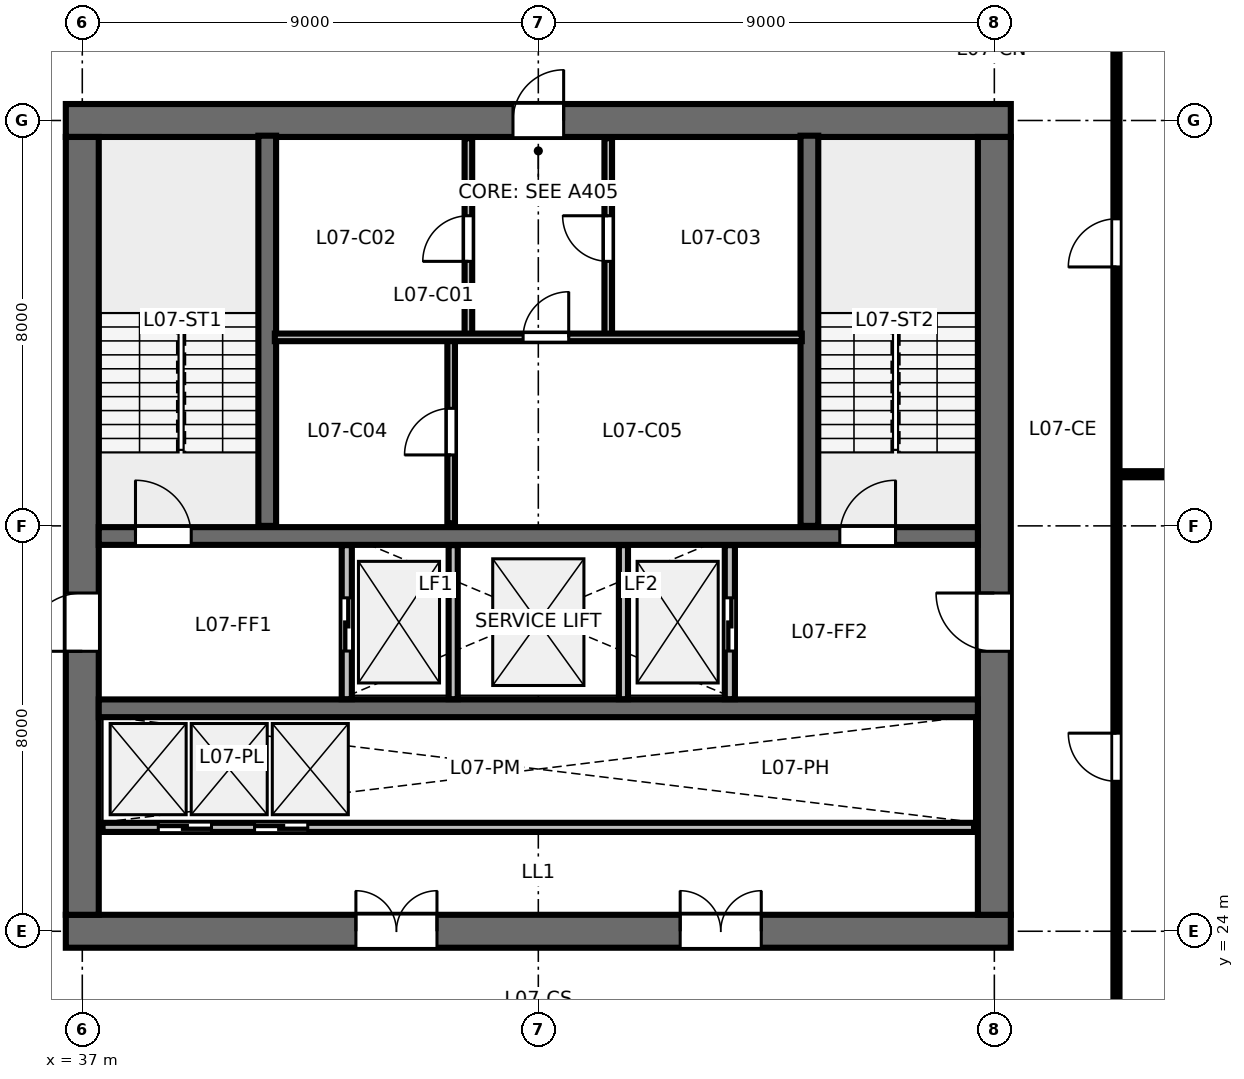
"""IFC4 building model, lengths in metres.
Left out: names, types, materials, properties, quantities, classifications, styles, units other than length and angle.
Written with IfcOpenShell. Run it as: python <this file> out.ifc"""

import sys

from ifc_helpers import new_model, si_unit, direction, frame, frame_2d, origin, place, context, subcontext, project, spatial, rectangle, extrude, element, fill, save


model = new_model("IFC4")
c1 = context("Model", 3, precision=1e-05, world=origin(), true_north=direction((0.0, 1.0)))
c2 = subcontext(c1, "Body", "Model", "MODEL_VIEW")
j1 = project(units=[si_unit("LENGTHUNIT", "METRE"), si_unit("PLANEANGLEUNIT", "RADIAN")], contexts=[c1])
p1 = place(None, origin())
s1 = spatial("IfcSite", under=j1, at=p1, CompositionType="ELEMENT")
p2 = place(p1, origin())
s2 = spatial("IfcBuilding", under=s1, at=p2, CompositionType="ELEMENT")
p3 = place(p2, frame((0.0, 0.0, 31.6)))
s3 = spatial("IfcBuildingStorey", under=s2, at=p3, CompositionType="ELEMENT", Elevation=31.6)
p4 = place(p3, frame((36.675, 24.0, 0.0), z_axis=(0.0, 0.0, 1.0), x_axis=(1.0, 0.0, 0.0)))
e1 = element("IfcWall", 1, at=p4, inside=s3, PredefinedType="SHEAR", context=c2, shape_type="SweptSolid", body=[
    extrude(rectangle(XDim=18.65, YDim=0.65, at=frame_2d((9.325, 0.0))), origin(), (0.0, 0.0, 1.0), 3.36),
])
p5 = place(p4, frame((5.725, 0.0, 0.0)))
e2 = element("IfcOpeningElement", 2, at=p5, cuts=e1, PredefinedType="OPENING", context=c2, shape_type="SweptSolid", body=[
    extrude(rectangle(XDim=1.6, YDim=2.15, at=frame_2d((0.8, 1.075))), frame((0.0, 0.335, 0.0), z_axis=(0.0, -1.0, 0.0), x_axis=(1.0, 0.0, 0.0)), (0.0, 0.0, 1.0), 0.67),
])
p6 = place(p4, frame((12.125, 0.0, 0.0)))
e3 = element("IfcOpeningElement", 3, at=p6, cuts=e1, PredefinedType="OPENING", context=c2, shape_type="SweptSolid", body=[
    extrude(rectangle(XDim=1.6, YDim=2.15, at=frame_2d((0.8, 1.075))), frame((0.0, 0.335, 0.0), z_axis=(0.0, -1.0, 0.0), x_axis=(1.0, 0.0, 0.0)), (0.0, 0.0, 1.0), 0.67),
])
p7 = place(p3, frame((36.675, 40.0, 0.0), z_axis=(0.0, 0.0, 1.0), x_axis=(1.0, 0.0, 0.0)))
e4 = element("IfcWall", 4, at=p7, inside=s3, PredefinedType="SHEAR", context=c2, shape_type="SweptSolid", body=[
    extrude(rectangle(XDim=18.65, YDim=0.65, at=frame_2d((9.325, 0.0))), origin(), (0.0, 0.0, 1.0), 3.36),
])
p8 = place(p7, frame((8.825, 0.0, 0.0)))
e5 = element("IfcOpeningElement", 5, at=p8, cuts=e4, PredefinedType="OPENING", context=c2, shape_type="SweptSolid", body=[
    extrude(rectangle(XDim=1.0, YDim=2.15, at=frame_2d((0.5, 1.075))), frame((0.0, 0.335, 0.0), z_axis=(0.0, -1.0, 0.0), x_axis=(1.0, 0.0, 0.0)), (0.0, 0.0, 1.0), 0.67),
])
p9 = place(p3, frame((37.0, 24.325, 0.0), z_axis=(0.0, 0.0, 1.0), x_axis=(0.0, 1.0, 0.0)))
e6 = element("IfcWall", 6, at=p9, inside=s3, PredefinedType="SHEAR", context=c2, shape_type="SweptSolid", body=[
    extrude(rectangle(XDim=15.35, YDim=0.65, at=frame_2d((7.675, 0.0))), origin(), (0.0, 0.0, 1.0), 3.36),
])
p10 = place(p9, frame((5.2, 0.0, 0.0)))
e7 = element("IfcOpeningElement", 7, at=p10, cuts=e6, PredefinedType="OPENING", context=c2, shape_type="SweptSolid", body=[
    extrude(rectangle(XDim=1.15, YDim=2.15, at=frame_2d((0.575, 1.075))), frame((0.0, 0.335, 0.0), z_axis=(0.0, -1.0, 0.0), x_axis=(1.0, 0.0, 0.0)), (0.0, 0.0, 1.0), 0.67),
])
p11 = place(p3, frame((55.0, 24.325, 0.0), z_axis=(0.0, 0.0, 1.0), x_axis=(0.0, 1.0, 0.0)))
e8 = element("IfcWall", 8, at=p11, inside=s3, PredefinedType="SHEAR", context=c2, shape_type="SweptSolid", body=[
    extrude(rectangle(XDim=15.35, YDim=0.65, at=frame_2d((7.675, 0.0))), origin(), (0.0, 0.0, 1.0), 3.36),
])
p12 = place(p11, frame((5.2, 0.0, 0.0)))
e9 = element("IfcOpeningElement", 9, at=p12, cuts=e8, PredefinedType="OPENING", context=c2, shape_type="SweptSolid", body=[
    extrude(rectangle(XDim=1.15, YDim=2.15, at=frame_2d((0.575, 1.075))), frame((0.0, 0.335, 0.0), z_axis=(0.0, -1.0, 0.0), x_axis=(1.0, 0.0, 0.0)), (0.0, 0.0, 1.0), 0.67),
])
p13 = place(p3, frame((37.325, 31.8, 0.0), z_axis=(0.0, 0.0, 1.0), x_axis=(1.0, 0.0, 0.0)))
e10 = element("IfcWall", 10, at=p13, inside=s3, PredefinedType="SHEAR", context=c2, shape_type="SweptSolid", body=[
    extrude(rectangle(XDim=17.35, YDim=0.35, at=frame_2d((8.675, 0.0))), origin(), (0.0, 0.0, 1.0), 3.36),
])
p14 = place(p13, frame((0.725, 0.0, 0.0)))
e11 = element("IfcOpeningElement", 11, at=p14, cuts=e10, PredefinedType="OPENING", context=c2, shape_type="SweptSolid", body=[
    extrude(rectangle(XDim=1.1, YDim=2.15, at=frame_2d((0.55, 1.075))), frame((0.0, 0.185, 0.0), z_axis=(0.0, -1.0, 0.0), x_axis=(1.0, 0.0, 0.0)), (0.0, 0.0, 1.0), 0.37),
])
p15 = place(p13, frame((14.625, 0.0, 0.0)))
e12 = element("IfcOpeningElement", 12, at=p15, cuts=e10, PredefinedType="OPENING", context=c2, shape_type="SweptSolid", body=[
    extrude(rectangle(XDim=1.1, YDim=2.15, at=frame_2d((0.55, 1.075))), frame((0.0, 0.185, 0.0), z_axis=(0.0, -1.0, 0.0), x_axis=(1.0, 0.0, 0.0)), (0.0, 0.0, 1.0), 0.37),
])
p16 = place(p3, frame((37.325, 28.4, 0.0), z_axis=(0.0, 0.0, 1.0), x_axis=(1.0, 0.0, 0.0)))
e13 = element("IfcWall", 13, at=p16, inside=s3, PredefinedType="SHEAR", context=c2, shape_type="SweptSolid", body=[
    extrude(rectangle(XDim=17.35, YDim=0.35, at=frame_2d((8.675, 0.0))), origin(), (0.0, 0.0, 1.0), 3.36),
])
for number, where, z_axis, x_axis in (
    (14, (40.65, 32.0, 0.0), (0.0, 0.0, 1.0), (0.0, 1.0, 0.0)),
    (15, (51.35, 32.0, 0.0), (0.0, 0.0, 1.0), (0.0, 1.0, 0.0)),
):
    element("IfcWall", number, at=place(p3, frame(where, z_axis=z_axis, x_axis=x_axis)), inside=s3, PredefinedType="SHEAR", context=c2, shape_type="SweptSolid", body=[
        extrude(rectangle(XDim=7.7, YDim=0.35, at=frame_2d((3.85, 0.0))), origin(), (0.0, 0.0, 1.0), 3.6),
    ])
p17 = place(p3, frame((44.62, 35.72, 0.0), z_axis=(0.0, 0.0, 1.0), x_axis=(0.0, 1.0, 0.0)))
e16 = element("IfcWall", 16, at=p17, inside=s3, PredefinedType="PARTITIONING", context=c2, shape_type="SweptSolid", body=[
    extrude(rectangle(XDim=3.93, YDim=0.15, at=frame_2d((1.965, 0.0))), origin(), (0.0, 0.0, 1.0), 3.15),
])
p18 = place(p17, frame((1.5, 0.0, 0.0)))
e17 = element("IfcOpeningElement", 17, at=p18, cuts=e16, PredefinedType="OPENING", context=c2, shape_type="SweptSolid", body=[
    extrude(rectangle(XDim=0.9, YDim=2.15, at=frame_2d((0.45, 1.075))), frame((0.0, 0.085, 0.0), z_axis=(0.0, -1.0, 0.0), x_axis=(1.0, 0.0, 0.0)), (0.0, 0.0, 1.0), 0.17),
])
p19 = place(p3, frame((47.38, 35.72, 0.0), z_axis=(0.0, 0.0, 1.0), x_axis=(0.0, 1.0, 0.0)))
e18 = element("IfcWall", 18, at=p19, inside=s3, PredefinedType="PARTITIONING", context=c2, shape_type="SweptSolid", body=[
    extrude(rectangle(XDim=3.93, YDim=0.15, at=frame_2d((1.965, 0.0))), origin(), (0.0, 0.0, 1.0), 3.15),
])
p20 = place(p19, frame((1.5, 0.0, 0.0)))
e19 = element("IfcOpeningElement", 19, at=p20, cuts=e18, PredefinedType="OPENING", context=c2, shape_type="SweptSolid", body=[
    extrude(rectangle(XDim=0.9, YDim=2.15, at=frame_2d((0.45, 1.075))), frame((0.0, 0.085, 0.0), z_axis=(0.0, -1.0, 0.0), x_axis=(1.0, 0.0, 0.0)), (0.0, 0.0, 1.0), 0.17),
])
p21 = place(p3, frame((44.28, 32.05, 0.0), z_axis=(0.0, 0.0, 1.0), x_axis=(0.0, 1.0, 0.0)))
e20 = element("IfcWall", 20, at=p21, inside=s3, PredefinedType="PARTITIONING", context=c2, shape_type="SweptSolid", body=[
    extrude(rectangle(XDim=3.67, YDim=0.15, at=frame_2d((1.835, 0.0))), origin(), (0.0, 0.0, 1.0), 3.15),
])
p22 = place(p21, frame((1.35, 0.0, 0.0)))
e21 = element("IfcOpeningElement", 21, at=p22, cuts=e20, PredefinedType="OPENING", context=c2, shape_type="SweptSolid", body=[
    extrude(rectangle(XDim=0.92, YDim=2.15, at=frame_2d((0.46, 1.075))), frame((0.0, 0.085, 0.0), z_axis=(0.0, -1.0, 0.0), x_axis=(1.0, 0.0, 0.0)), (0.0, 0.0, 1.0), 0.17),
])
p23 = place(p3, frame((40.8, 35.72, 0.0), z_axis=(0.0, 0.0, 1.0), x_axis=(1.0, 0.0, 0.0)))
e22 = element("IfcWall", 22, at=p23, inside=s3, PredefinedType="PARTITIONING", context=c2, shape_type="SweptSolid", body=[
    extrude(rectangle(XDim=10.4, YDim=0.15, at=frame_2d((5.2, 0.0))), origin(), (0.0, 0.0, 1.0), 3.15),
])
p24 = place(p23, frame((4.9, 0.0, 0.0)))
e23 = element("IfcOpeningElement", 23, at=p24, cuts=e22, PredefinedType="OPENING", context=c2, shape_type="SweptSolid", body=[
    extrude(rectangle(XDim=0.9, YDim=2.15, at=frame_2d((0.45, 1.075))), frame((0.0, 0.085, 0.0), z_axis=(0.0, -1.0, 0.0), x_axis=(1.0, 0.0, 0.0)), (0.0, 0.0, 1.0), 0.17),
])
p25 = place(p3, frame((42.22, 28.58, 0.0), z_axis=(0.0, 0.0, 1.0), x_axis=(0.0, 1.0, 0.0)))
e24 = element("IfcWall", 24, at=p25, inside=s3, PredefinedType="PARTITIONING", context=c2, shape_type="SweptSolid", body=[
    extrude(rectangle(XDim=3.04, YDim=0.2, at=frame_2d((1.52, 0.0))), origin(), (0.0, 0.0, 1.0), 3.15),
])
p26 = place(p25, frame((0.95, 0.0, 0.0)))
e25 = element("IfcOpeningElement", 25, at=p26, cuts=e24, PredefinedType="OPENING", context=c2, shape_type="SweptSolid", body=[
    extrude(rectangle(XDim=1.05, YDim=2.15, at=frame_2d((0.525, 1.075))), frame((0.0, 0.11, 0.0), z_axis=(0.0, -1.0, 0.0), x_axis=(1.0, 0.0, 0.0)), (0.0, 0.0, 1.0), 0.22),
])
p27 = place(p3, frame((49.78, 28.58, 0.0), z_axis=(0.0, 0.0, 1.0), x_axis=(0.0, 1.0, 0.0)))
e26 = element("IfcWall", 26, at=p27, inside=s3, PredefinedType="PARTITIONING", context=c2, shape_type="SweptSolid", body=[
    extrude(rectangle(XDim=3.04, YDim=0.2, at=frame_2d((1.52, 0.0))), origin(), (0.0, 0.0, 1.0), 3.15),
])
p28 = place(p27, frame((0.95, 0.0, 0.0)))
e27 = element("IfcOpeningElement", 27, at=p28, cuts=e26, PredefinedType="OPENING", context=c2, shape_type="SweptSolid", body=[
    extrude(rectangle(XDim=1.05, YDim=2.15, at=frame_2d((0.525, 1.075))), frame((0.0, 0.11, 0.0), z_axis=(0.0, -1.0, 0.0), x_axis=(1.0, 0.0, 0.0)), (0.0, 0.0, 1.0), 0.22),
])
for number, where, z_axis, x_axis in (
    (28, (44.32, 28.58, 0.0), (0.0, 0.0, 1.0), (0.0, 1.0, 0.0)),
    (29, (47.68, 28.58, 0.0), (0.0, 0.0, 1.0), (0.0, 1.0, 0.0)),
):
    element("IfcWall", number, at=place(p3, frame(where, z_axis=z_axis, x_axis=x_axis)), inside=s3, PredefinedType="PARTITIONING", context=c2, shape_type="SweptSolid", body=[
        extrude(rectangle(XDim=3.04, YDim=0.18, at=frame_2d((1.52, 0.0))), origin(), (0.0, 0.0, 1.0), 3.15),
    ])
p29 = place(p3, frame((37.4, 26.05, 0.0), z_axis=(0.0, 0.0, 1.0), x_axis=(1.0, 0.0, 0.0)))
e30 = element("IfcWall", 30, at=p29, inside=s3, PredefinedType="PARTITIONING", context=c2, shape_type="SweptSolid", body=[
    extrude(rectangle(XDim=17.2, YDim=0.18, at=frame_2d((8.6, 0.0))), origin(), (0.0, 0.0, 1.0), 3.15),
])
p30 = place(p29, frame((1.1, 0.0, 0.0)))
e31 = element("IfcOpeningElement", 31, at=p30, cuts=e30, PredefinedType="OPENING", context=c2, shape_type="SweptSolid", body=[
    extrude(rectangle(XDim=1.05, YDim=2.15, at=frame_2d((0.525, 1.075))), frame((0.0, 0.1, 0.0), z_axis=(0.0, -1.0, 0.0), x_axis=(1.0, 0.0, 0.0)), (0.0, 0.0, 1.0), 0.2),
])
p31 = place(p29, frame((3.0, 0.0, 0.0)))
e32 = element("IfcOpeningElement", 32, at=p31, cuts=e30, PredefinedType="OPENING", context=c2, shape_type="SweptSolid", body=[
    extrude(rectangle(XDim=1.05, YDim=2.15, at=frame_2d((0.525, 1.075))), frame((0.0, 0.1, 0.0), z_axis=(0.0, -1.0, 0.0), x_axis=(1.0, 0.0, 0.0)), (0.0, 0.0, 1.0), 0.2),
])
p32 = place(p3, frame((57.41, 33.019, 0.0), z_axis=(0.0, 0.0, 1.0), x_axis=(1.0, 0.0, 0.0)))
e33 = element("IfcWall", 33, at=p32, inside=s3, PredefinedType="PARTITIONING", context=c2, shape_type="SweptSolid", body=[
    extrude(rectangle(XDim=12.01, YDim=0.12, at=frame_2d((6.005, 0.0))), origin(), (0.0, 0.0, 1.0), 2.43),
])
p33 = place(p32, frame((1.4, 0.0, 0.0)))
e34 = element("IfcOpeningElement", 34, at=p33, cuts=e33, PredefinedType="OPENING", context=c2, shape_type="SweptSolid", body=[
    extrude(rectangle(XDim=0.9, YDim=2.15, at=frame_2d((0.45, 1.075))), frame((0.0, 0.07, 0.0), z_axis=(0.0, -1.0, 0.0), x_axis=(1.0, 0.0, 0.0)), (0.0, 0.0, 1.0), 0.14),
])
p34 = place(p3, frame((57.41, 21.65, 0.0), z_axis=(0.0, 0.0, 1.0), x_axis=(0.0, 1.0, 0.0)))
e35 = element("IfcWall", 35, at=p34, inside=s3, PredefinedType="PARTITIONING", context=c2, shape_type="SweptSolid", body=[
    extrude(rectangle(XDim=20.7, YDim=0.12, at=frame_2d((10.35, 0.0))), origin(), (0.0, 0.0, 1.0), 2.43),
])
p35 = place(p34, frame((5.31, 0.0, 0.0)))
e36 = element("IfcOpeningElement", 36, at=p35, cuts=e35, PredefinedType="OPENING", context=c2, shape_type="SweptSolid", body=[
    extrude(rectangle(XDim=0.95, YDim=2.15, at=frame_2d((0.475, 1.075))), frame((0.0, 0.07, 0.0), z_axis=(0.0, -1.0, 0.0), x_axis=(1.0, 0.0, 0.0)), (0.0, 0.0, 1.0), 0.14),
])
p36 = place(p34, frame((15.459, 0.0, 0.0)))
e37 = element("IfcOpeningElement", 37, at=p36, cuts=e35, PredefinedType="OPENING", context=c2, shape_type="SweptSolid", body=[
    extrude(rectangle(XDim=0.95, YDim=2.15, at=frame_2d((0.475, 1.075))), frame((0.0, 0.07, 0.0), z_axis=(0.0, -1.0, 0.0), x_axis=(1.0, 0.0, 0.0)), (0.0, 0.0, 1.0), 0.14),
])
p37 = place(p14, origin())
e38 = element("IfcDoor", 38, at=p37, inside=s3, OperationType="SINGLE_SWING_LEFT", PredefinedType="DOOR", context=c2, shape_type="SweptSolid", body=[
    extrude(rectangle(XDim=1.1, YDim=2.15, at=frame_2d((0.55, 1.075))), frame((0.0, 0.025, 0.0), z_axis=(0.0, -1.0, 0.0), x_axis=(1.0, 0.0, 0.0)), (0.0, 0.0, 1.0), 0.05),
])
fill(e11, e38)
p38 = place(p15, origin())
e39 = element("IfcDoor", 39, at=p38, inside=s3, OperationType="SINGLE_SWING_RIGHT", PredefinedType="DOOR", context=c2, shape_type="SweptSolid", body=[
    extrude(rectangle(XDim=1.1, YDim=2.15, at=frame_2d((0.55, 1.075))), frame((0.0, 0.025, 0.0), z_axis=(0.0, -1.0, 0.0), x_axis=(1.0, 0.0, 0.0)), (0.0, 0.0, 1.0), 0.05),
])
fill(e12, e39)
p39 = place(p8, origin())
e40 = element("IfcDoor", 40, at=p39, inside=s3, OperationType="SINGLE_SWING_RIGHT", PredefinedType="DOOR", context=c2, shape_type="SweptSolid", body=[
    extrude(rectangle(XDim=1.0, YDim=2.15, at=frame_2d((0.5, 1.075))), frame((0.0, 0.025, 0.0), z_axis=(0.0, -1.0, 0.0), x_axis=(1.0, 0.0, 0.0)), (0.0, 0.0, 1.0), 0.05),
])
fill(e5, e40)
p40 = place(p10, origin())
e41 = element("IfcDoor", 41, at=p40, inside=s3, OperationType="SINGLE_SWING_LEFT", PredefinedType="DOOR", context=c2, shape_type="SweptSolid", body=[
    extrude(rectangle(XDim=1.15, YDim=2.15, at=frame_2d((0.575, 1.075))), frame((0.0, 0.025, 0.0), z_axis=(0.0, -1.0, 0.0), x_axis=(1.0, 0.0, 0.0)), (0.0, 0.0, 1.0), 0.05),
])
fill(e7, e41)
p41 = place(p12, origin())
e42 = element("IfcDoor", 42, at=p41, inside=s3, OperationType="SINGLE_SWING_RIGHT", PredefinedType="DOOR", context=c2, shape_type="SweptSolid", body=[
    extrude(rectangle(XDim=1.15, YDim=2.15, at=frame_2d((0.575, 1.075))), frame((0.0, 0.025, 0.0), z_axis=(0.0, -1.0, 0.0), x_axis=(1.0, 0.0, 0.0)), (0.0, 0.0, 1.0), 0.05),
])
fill(e9, e42)
p42 = place(p5, origin())
e43 = element("IfcDoor", 43, at=p42, inside=s3, OperationType="DOUBLE_DOOR_SINGLE_SWING", PredefinedType="DOOR", context=c2, shape_type="SweptSolid", body=[
    extrude(rectangle(XDim=1.6, YDim=2.15, at=frame_2d((0.8, 1.075))), frame((0.0, 0.025, 0.0), z_axis=(0.0, -1.0, 0.0), x_axis=(1.0, 0.0, 0.0)), (0.0, 0.0, 1.0), 0.05),
])
fill(e2, e43)
p43 = place(p6, origin())
e44 = element("IfcDoor", 44, at=p43, inside=s3, OperationType="DOUBLE_DOOR_SINGLE_SWING", PredefinedType="DOOR", context=c2, shape_type="SweptSolid", body=[
    extrude(rectangle(XDim=1.6, YDim=2.15, at=frame_2d((0.8, 1.075))), frame((0.0, 0.025, 0.0), z_axis=(0.0, -1.0, 0.0), x_axis=(1.0, 0.0, 0.0)), (0.0, 0.0, 1.0), 0.05),
])
fill(e3, e44)
p44 = place(p18, origin())
e45 = element("IfcDoor", 45, at=p44, inside=s3, OperationType="SINGLE_SWING_LEFT", PredefinedType="DOOR", context=c2, shape_type="SweptSolid", body=[
    extrude(rectangle(XDim=0.9, YDim=2.15, at=frame_2d((0.45, 1.075))), frame((0.0, 0.025, 0.0), z_axis=(0.0, -1.0, 0.0), x_axis=(1.0, 0.0, 0.0)), (0.0, 0.0, 1.0), 0.05),
])
fill(e17, e45)
p45 = place(p20, origin())
e46 = element("IfcDoor", 46, at=p45, inside=s3, OperationType="SINGLE_SWING_RIGHT", PredefinedType="DOOR", context=c2, shape_type="SweptSolid", body=[
    extrude(rectangle(XDim=0.9, YDim=2.15, at=frame_2d((0.45, 1.075))), frame((0.0, 0.025, 0.0), z_axis=(0.0, -1.0, 0.0), x_axis=(1.0, 0.0, 0.0)), (0.0, 0.0, 1.0), 0.05),
])
fill(e19, e46)
p46 = place(p22, origin())
e47 = element("IfcDoor", 47, at=p46, inside=s3, OperationType="SINGLE_SWING_LEFT", PredefinedType="DOOR", context=c2, shape_type="SweptSolid", body=[
    extrude(rectangle(XDim=0.92, YDim=2.15, at=frame_2d((0.46, 1.075))), frame((0.0, 0.025, 0.0), z_axis=(0.0, -1.0, 0.0), x_axis=(1.0, 0.0, 0.0)), (0.0, 0.0, 1.0), 0.05),
])
fill(e21, e47)
p47 = place(p24, origin())
e48 = element("IfcDoor", 48, at=p47, inside=s3, OperationType="SINGLE_SWING_RIGHT", PredefinedType="DOOR", context=c2, shape_type="SweptSolid", body=[
    extrude(rectangle(XDim=0.9, YDim=2.15, at=frame_2d((0.45, 1.075))), frame((0.0, 0.025, 0.0), z_axis=(0.0, -1.0, 0.0), x_axis=(1.0, 0.0, 0.0)), (0.0, 0.0, 1.0), 0.05),
])
fill(e23, e48)
p48 = place(p26, origin())
e49 = element("IfcDoor", 49, at=p48, inside=s3, OperationType="SLIDING_TO_LEFT", PredefinedType="DOOR", context=c2, shape_type="SweptSolid", body=[
    extrude(rectangle(XDim=1.05, YDim=2.15, at=frame_2d((0.525, 1.075))), frame((0.0, 0.025, 0.0), z_axis=(0.0, -1.0, 0.0), x_axis=(1.0, 0.0, 0.0)), (0.0, 0.0, 1.0), 0.05),
])
fill(e25, e49)
p49 = place(p28, origin())
e50 = element("IfcDoor", 50, at=p49, inside=s3, OperationType="SLIDING_TO_RIGHT", PredefinedType="DOOR", context=c2, shape_type="SweptSolid", body=[
    extrude(rectangle(XDim=1.05, YDim=2.15, at=frame_2d((0.525, 1.075))), frame((0.0, 0.025, 0.0), z_axis=(0.0, -1.0, 0.0), x_axis=(1.0, 0.0, 0.0)), (0.0, 0.0, 1.0), 0.05),
])
fill(e27, e50)
p50 = place(p30, origin())
e51 = element("IfcDoor", 51, at=p50, inside=s3, OperationType="SLIDING_TO_LEFT", PredefinedType="DOOR", context=c2, shape_type="SweptSolid", body=[
    extrude(rectangle(XDim=1.05, YDim=2.15, at=frame_2d((0.525, 1.075))), frame((0.0, 0.025, 0.0), z_axis=(0.0, -1.0, 0.0), x_axis=(1.0, 0.0, 0.0)), (0.0, 0.0, 1.0), 0.05),
])
fill(e31, e51)
p51 = place(p31, origin())
e52 = element("IfcDoor", 52, at=p51, inside=s3, OperationType="SLIDING_TO_RIGHT", PredefinedType="DOOR", context=c2, shape_type="SweptSolid", body=[
    extrude(rectangle(XDim=1.05, YDim=2.15, at=frame_2d((0.525, 1.075))), frame((0.0, 0.025, 0.0), z_axis=(0.0, -1.0, 0.0), x_axis=(1.0, 0.0, 0.0)), (0.0, 0.0, 1.0), 0.05),
])
fill(e32, e52)
p52 = place(p35, origin())
e53 = element("IfcDoor", 53, at=p52, inside=s3, OperationType="SINGLE_SWING_RIGHT", PredefinedType="DOOR", context=c2, shape_type="SweptSolid", body=[
    extrude(rectangle(XDim=0.95, YDim=2.15, at=frame_2d((0.475, 1.075))), frame((0.0, 0.025, 0.0), z_axis=(0.0, -1.0, 0.0), x_axis=(1.0, 0.0, 0.0)), (0.0, 0.0, 1.0), 0.05),
])
fill(e36, e53)
p53 = place(p36, origin())
e54 = element("IfcDoor", 54, at=p53, inside=s3, OperationType="SINGLE_SWING_LEFT", PredefinedType="DOOR", context=c2, shape_type="SweptSolid", body=[
    extrude(rectangle(XDim=0.95, YDim=2.15, at=frame_2d((0.475, 1.075))), frame((0.0, 0.025, 0.0), z_axis=(0.0, -1.0, 0.0), x_axis=(1.0, 0.0, 0.0)), (0.0, 0.0, 1.0), 0.05),
])
fill(e37, e54)
save(model, sys.argv[1])
